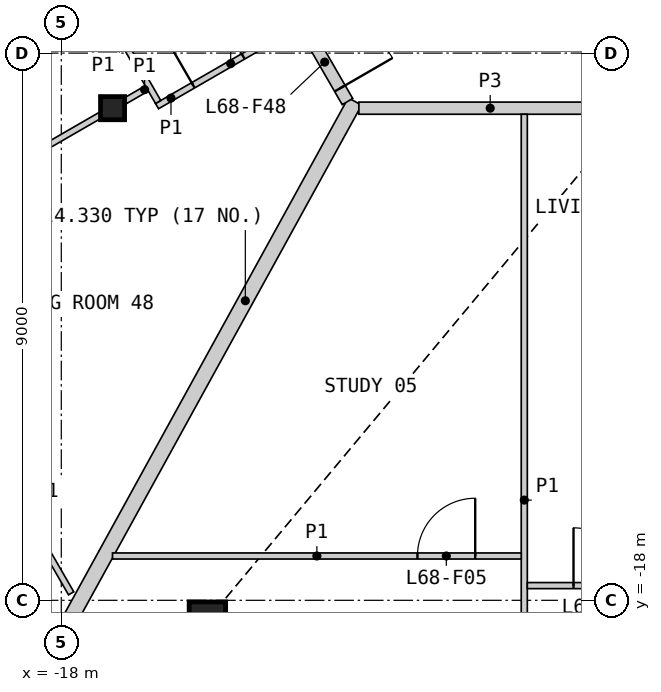
"""IFC4 building model, lengths in metres.
Left out: names, types, materials, properties, quantities, classifications, styles, units other than length and angle.
Written with IfcOpenShell. Run it as: python <this file> out.ifc"""

import sys

from ifc_helpers import new_model, si_unit, direction, frame, frame_2d, origin, origin_2d, place, context, subcontext, project, spatial, rectangle, hollow_rectangle, i_section, extrude, element, fill, save


model = new_model("IFC4")
c1 = context("Model", 3, precision=1e-05, world=origin(), true_north=direction((0.0, 1.0)))
c2 = subcontext(c1, "Body", "Model", "MODEL_VIEW")
j1 = project(units=[si_unit("LENGTHUNIT", "METRE"), si_unit("PLANEANGLEUNIT", "RADIAN")], contexts=[c1])
p1 = place(None, origin())
s1 = spatial("IfcSite", under=j1, at=p1, CompositionType="ELEMENT")
p2 = place(p1, origin())
s2 = spatial("IfcBuilding", under=s1, at=p2, CompositionType="ELEMENT")
p3 = place(p2, frame((0.0, 0.0, 312.0)))
s3 = spatial("IfcBuildingStorey", under=s2, at=p3, CompositionType="ELEMENT", Elevation=312.0)
p4 = place(p3, frame((-15.597, -18.327, 0.0), z_axis=(0.0, 0.0, 1.0), x_axis=(1.0, 0.0, 0.0)))
e1 = element("IfcColumn", 1, at=p4, inside=s3, PredefinedType="COLUMN", context=c2, shape_type="SweptSolid", body=[
    extrude(hollow_rectangle(XDim=0.6, YDim=0.6, WallThickness=0.04, at=origin_2d()), origin(), (0.0, 0.0, 1.0), 3.4),
])
p5 = place(p3, frame((-17.157, -9.906, 0.0), z_axis=(0.0, 0.0, 1.0), x_axis=(1.0, 0.0, 0.0)))
e2 = element("IfcColumn", 2, at=p5, inside=s3, PredefinedType="COLUMN", context=c2, shape_type="SweptSolid", body=[
    extrude(i_section(OverallWidth=0.396, OverallDepth=0.381, WebThickness=0.019, FlangeThickness=0.03, at=origin_2d()), origin(), (0.0, 0.0, 1.0), 3.4),
])
p6 = place(p3, frame((-20.381, -22.904, 0.0), z_axis=(0.0, 0.0, 1.0), x_axis=(0.481994550341, 0.876174214093, 0.0)))
e3 = element("IfcWall", 3, at=p6, inside=s3, PredefinedType="PARTITIONING", context=c2, shape_type="SweptSolid", body=[
    extrude(rectangle(XDim=14.96, YDim=0.25, at=frame_2d((7.48, 0.0))), origin(), (0.0, 0.0, 1.0), 2.33),
])
p7 = place(p3, frame((-13.106, -9.906, 0.0), z_axis=(0.0, 0.0, 1.0), x_axis=(1.0, 0.0, 0.0)))
e4 = element("IfcWall", 4, at=p7, inside=s3, PredefinedType="PARTITIONING", context=c2, shape_type="SweptSolid", body=[
    extrude(rectangle(XDim=4.32, YDim=0.2, at=frame_2d((2.16, 0.0))), origin(), (0.0, 0.0, 1.0), 3.1),
])
p8 = place(p3, frame((-15.131, -6.614, 0.0), z_axis=(0.0, 0.0, 1.0), x_axis=(0.499967746641, -0.866044024469, 0.0)))
e5 = element("IfcWall", 5, at=p8, inside=s3, PredefinedType="PARTITIONING", context=c2, shape_type="SweptSolid", body=[
    extrude(rectangle(XDim=3.676, YDim=0.2, at=frame_2d((1.838, 0.0))), origin(), (0.0, 0.0, 1.0), 3.1),
])
p9 = place(p8, frame((2.426, 0.0, 0.0)))
e6 = element("IfcOpeningElement", 6, at=p9, cuts=e5, PredefinedType="OPENING", context=c2, shape_type="SweptSolid", body=[
    extrude(rectangle(XDim=1.0, YDim=2.1, at=frame_2d((0.5, 1.05))), frame((0.0, 0.11, 0.0), z_axis=(0.0, -1.0, 0.0), x_axis=(1.0, 0.0, 0.0)), (0.0, 0.0, 1.0), 0.22),
])
p10 = place(p3, frame((-29.338, -13.042, 0.0), z_axis=(0.0, 0.0, 1.0), x_axis=(0.93358243931, 0.358362705944, 0.0)))
e7 = element("IfcWall", 7, at=p10, inside=s3, PredefinedType="PARTITIONING", context=c2, shape_type="SweptSolid", body=[
    extrude(rectangle(XDim=12.928, YDim=0.1, at=frame_2d((6.464, 0.0))), origin(), (0.0, 0.0, 1.0), 2.33),
])
p11 = place(p10, frame((5.183, 0.0, 0.0)))
e8 = element("IfcOpeningElement", 8, at=p11, cuts=e7, PredefinedType="OPENING", context=c2, shape_type="SweptSolid", body=[
    extrude(rectangle(XDim=0.95, YDim=2.1, at=frame_2d((0.475, 1.05))), frame((0.0, 0.06, 0.0), z_axis=(0.0, -1.0, 0.0), x_axis=(1.0, 0.0, 0.0)), (0.0, 0.0, 1.0), 0.12),
])
p12 = place(p3, frame((-10.385, -22.698, 0.0), z_axis=(0.0, 0.0, 1.0), x_axis=(0.0, 1.0, 0.0)))
e9 = element("IfcWall", 9, at=p12, inside=s3, PredefinedType="PARTITIONING", context=c2, shape_type="SweptSolid", body=[
    extrude(rectangle(XDim=12.692, YDim=0.1, at=frame_2d((6.346, 0.0))), origin(), (0.0, 0.0, 1.0), 2.33),
])
p13 = place(p12, frame((1.153, 0.0, 0.0)))
e10 = element("IfcOpeningElement", 10, at=p13, cuts=e9, PredefinedType="OPENING", context=c2, shape_type="SweptSolid", body=[
    extrude(rectangle(XDim=0.95, YDim=2.1, at=frame_2d((0.475, 1.05))), frame((0.0, 0.06, 0.0), z_axis=(0.0, -1.0, 0.0), x_axis=(1.0, 0.0, 0.0)), (0.0, 0.0, 1.0), 0.12),
])
p14 = place(p3, frame((-27.122, -15.659, 0.0), z_axis=(0.0, 0.0, 1.0), x_axis=(0.866021046153, 0.500007547564, 0.0)))
e11 = element("IfcWall", 11, at=p14, inside=s3, PredefinedType="PARTITIONING", context=c2, shape_type="SweptSolid", body=[
    extrude(rectangle(XDim=11.267, YDim=0.1, at=frame_2d((5.634, 0.0))), origin(), (0.0, 0.0, 1.0), 2.33),
])
p15 = place(p14, frame((1.452, 0.0, 0.0)))
e12 = element("IfcOpeningElement", 12, at=p15, cuts=e11, PredefinedType="OPENING", context=c2, shape_type="SweptSolid", body=[
    extrude(rectangle(XDim=0.95, YDim=2.1, at=frame_2d((0.475, 1.05))), frame((0.0, 0.06, 0.0), z_axis=(0.0, -1.0, 0.0), x_axis=(1.0, 0.0, 0.0)), (0.0, 0.0, 1.0), 0.12),
])
p16 = place(p3, frame((-17.158, -17.271, 0.0), z_axis=(0.0, 0.0, 1.0), x_axis=(1.0, 0.0, 0.0)))
e13 = element("IfcWall", 13, at=p16, inside=s3, PredefinedType="PARTITIONING", context=c2, shape_type="SweptSolid", body=[
    extrude(rectangle(XDim=6.722, YDim=0.1, at=frame_2d((3.361, 0.0))), origin(), (0.0, 0.0, 1.0), 2.33),
])
p17 = place(p16, frame((5.015, 0.0, 0.0)))
e14 = element("IfcOpeningElement", 14, at=p17, cuts=e13, PredefinedType="OPENING", context=c2, shape_type="SweptSolid", body=[
    extrude(rectangle(XDim=0.95, YDim=2.1, at=frame_2d((0.475, 1.05))), frame((0.0, 0.06, 0.0), z_axis=(0.0, -1.0, 0.0), x_axis=(1.0, 0.0, 0.0)), (0.0, 0.0, 1.0), 0.12),
])
p18 = place(p3, frame((-21.098, -12.239, 0.0), z_axis=(0.0, 0.0, 1.0), x_axis=(0.499973122483, -0.86604092097, 0.0)))
e15 = element("IfcWall", 15, at=p18, inside=s3, PredefinedType="PARTITIONING", context=c2, shape_type="SweptSolid", body=[
    extrude(rectangle(XDim=6.52, YDim=0.1, at=frame_2d((3.26, 0.0))), origin(), (0.0, 0.0, 1.0), 2.33),
])
p19 = place(p18, frame((3.596, 0.0, 0.0)))
e16 = element("IfcOpeningElement", 16, at=p19, cuts=e15, PredefinedType="OPENING", context=c2, shape_type="SweptSolid", body=[
    extrude(rectangle(XDim=0.95, YDim=2.1, at=frame_2d((0.475, 1.05))), frame((0.0, 0.06, 0.0), z_axis=(0.0, -1.0, 0.0), x_axis=(1.0, 0.0, 0.0)), (0.0, 0.0, 1.0), 0.12),
])
p20 = place(p3, frame((-10.336, -17.758, 0.0), z_axis=(0.0, 0.0, 1.0), x_axis=(1.0, 0.0, 0.0)))
e17 = element("IfcWall", 17, at=p20, inside=s3, PredefinedType="PARTITIONING", context=c2, shape_type="SweptSolid", body=[
    extrude(rectangle(XDim=5.018, YDim=0.1, at=frame_2d((2.509, 0.0))), origin(), (0.0, 0.0, 1.0), 2.33),
])
p21 = place(p20, frame((0.76, 0.0, 0.0)))
e18 = element("IfcOpeningElement", 18, at=p21, cuts=e17, PredefinedType="OPENING", context=c2, shape_type="SweptSolid", body=[
    extrude(rectangle(XDim=0.95, YDim=2.1, at=frame_2d((0.475, 1.05))), frame((0.0, 0.06, 0.0), z_axis=(0.0, -1.0, 0.0), x_axis=(1.0, 0.0, 0.0)), (0.0, 0.0, 1.0), 0.12),
])
p22 = place(p3, frame((-16.426, -9.872, 0.0), z_axis=(0.0, 0.0, 1.0), x_axis=(0.866029095148, 0.499993606316, 0.0)))
e19 = element("IfcWall", 19, at=p22, inside=s3, PredefinedType="PARTITIONING", context=c2, shape_type="SweptSolid", body=[
    extrude(rectangle(XDim=2.65, YDim=0.1, at=frame_2d((1.325, 0.0))), origin(), (0.0, 0.0, 1.0), 2.33),
])
p23 = place(p22, frame((0.686, 0.0, 0.0)))
e20 = element("IfcOpeningElement", 20, at=p23, cuts=e19, PredefinedType="OPENING", context=c2, shape_type="SweptSolid", body=[
    extrude(rectangle(XDim=0.95, YDim=2.1, at=frame_2d((0.475, 1.05))), frame((0.0, 0.06, 0.0), z_axis=(0.0, -1.0, 0.0), x_axis=(1.0, 0.0, 0.0)), (0.0, 0.0, 1.0), 0.12),
])
p24 = place(p3, frame((-17.507, -7.899, 0.0), z_axis=(0.0, 0.0, 1.0), x_axis=(0.499946605688, -0.86605622881, 0.0)))
e21 = element("IfcWall", 21, at=p24, inside=s3, PredefinedType="PARTITIONING", context=c2, shape_type="SweptSolid", body=[
    extrude(rectangle(XDim=2.2, YDim=0.1, at=frame_2d((1.1, 0.0))), origin(), (0.0, 0.0, 1.0), 2.33),
])
p25 = place(p3, frame((-16.949, -9.786, 0.0), z_axis=(0.0, 0.0, 1.0), x_axis=(0.866036909293, 0.499980071345, 0.0)))
e22 = element("IfcWall", 22, at=p25, inside=s3, PredefinedType="PARTITIONING", context=c2, shape_type="SweptSolid", body=[
    extrude(rectangle(XDim=0.41, YDim=0.1, at=frame_2d((0.205, 0.0))), origin(), (0.0, 0.0, 1.0), 2.33),
])
p26 = place(p21, origin())
e23 = element("IfcDoor", 23, at=p26, inside=s3, OperationType="SINGLE_SWING_LEFT", PredefinedType="DOOR", context=c2, shape_type="SweptSolid", body=[
    extrude(rectangle(XDim=0.95, YDim=2.1, at=frame_2d((0.475, 1.05))), frame((0.0, 0.025, 0.0), z_axis=(0.0, -1.0, 0.0), x_axis=(1.0, 0.0, 0.0)), (0.0, 0.0, 1.0), 0.05),
])
fill(e18, e23)
p27 = place(p17, origin())
e24 = element("IfcDoor", 24, at=p27, inside=s3, OperationType="SINGLE_SWING_RIGHT", PredefinedType="DOOR", context=c2, shape_type="SweptSolid", body=[
    extrude(rectangle(XDim=0.95, YDim=2.1, at=frame_2d((0.475, 1.05))), frame((0.0, 0.025, 0.0), z_axis=(0.0, -1.0, 0.0), x_axis=(1.0, 0.0, 0.0)), (0.0, 0.0, 1.0), 0.05),
])
fill(e14, e24)
p28 = place(p9, origin())
e25 = element("IfcDoor", 25, at=p28, inside=s3, OperationType="SINGLE_SWING_RIGHT", PredefinedType="DOOR", context=c2, shape_type="SweptSolid", body=[
    extrude(rectangle(XDim=1.0, YDim=2.1, at=frame_2d((0.5, 1.05))), frame((0.0, 0.025, 0.0), z_axis=(0.0, -1.0, 0.0), x_axis=(1.0, 0.0, 0.0)), (0.0, 0.0, 1.0), 0.05),
])
fill(e6, e25)
p29 = place(p23, origin())
e26 = element("IfcDoor", 26, at=p29, inside=s3, OperationType="SINGLE_SWING_LEFT", PredefinedType="DOOR", context=c2, shape_type="SweptSolid", body=[
    extrude(rectangle(XDim=0.95, YDim=2.1, at=frame_2d((0.475, 1.05))), frame((0.0, 0.025, 0.0), z_axis=(0.0, -1.0, 0.0), x_axis=(1.0, 0.0, 0.0)), (0.0, 0.0, 1.0), 0.05),
])
fill(e20, e26)
save(model, sys.argv[1])
